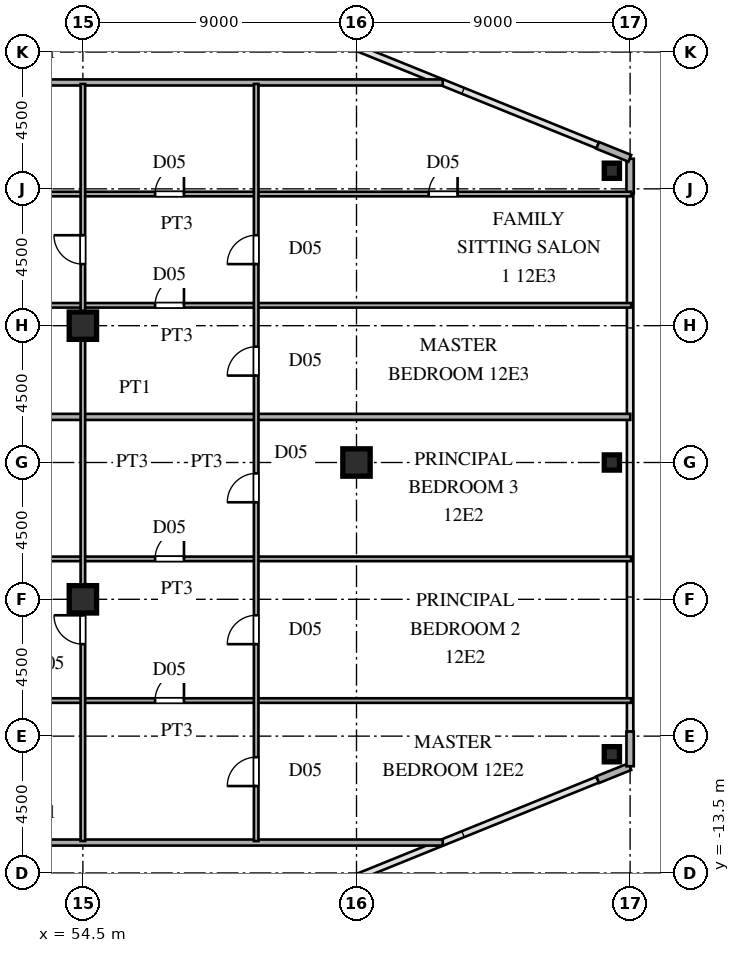
"""IFC4 building model, lengths in metres.
Left out: names, types, materials, properties, quantities, classifications, styles, units other than length and angle.
Written with IfcOpenShell. Run it as: python <this file> out.ifc"""

import sys

from ifc_helpers import new_model, si_unit, direction, frame, frame_2d, origin, origin_2d, place, context, subcontext, project, spatial, rectangle, hollow_rectangle, i_section, extrude, source, transform, mapped, element, fill, save


model = new_model("IFC4")
c1 = context("Model", 3, precision=1e-05, world=origin(), true_north=direction((0.0, 1.0)))
c2 = subcontext(c1, "Body", "Model", "MODEL_VIEW")
j1 = project(units=[si_unit("LENGTHUNIT", "METRE"), si_unit("PLANEANGLEUNIT", "RADIAN")], contexts=[c1])
p1 = place(None, origin())
s1 = spatial("IfcSite", under=j1, at=p1, CompositionType="ELEMENT")
p2 = place(p1, origin())
s2 = spatial("IfcBuilding", under=s1, at=p2, CompositionType="ELEMENT")
p3 = place(p2, frame((0.0, 0.0, 47.7)))
s3 = spatial("IfcBuildingStorey", under=s2, at=p3, CompositionType="ELEMENT", Elevation=47.7)
m1 = source(origin(), c2, "Body", "SweptSolid", [
    extrude(i_section(OverallWidth=0.9, OverallDepth=0.9, WebThickness=0.036, FlangeThickness=0.055, at=origin_2d()), origin(), (0.0, 0.0, 1.0), 3.6),
])
for number, where, z_axis, x_axis in (
    (1, (54.5, -4.5, 0.0), (0.0, 0.0, 1.0), (1.0, 0.0, 0.0)),
    (2, (54.5, 4.5, 0.0), (0.0, 0.0, 1.0), (1.0, 0.0, 0.0)),
    (3, (63.5, 0.0, 0.0), (0.0, 0.0, 1.0), (1.0, 0.0, 0.0)),
):
    element("IfcColumn", number, at=place(p3, frame(where, z_axis=z_axis, x_axis=x_axis)), inside=s3, PredefinedType="COLUMN", context=c2, shape_type="MappedRepresentation", body=[
        mapped(m1, transform((0.0, 0.0, 0.0), scale=1.0)),
    ])
m2 = source(origin(), c2, "Body", "SweptSolid", [
    extrude(hollow_rectangle(XDim=0.5, YDim=0.5, WallThickness=0.02, at=origin_2d()), origin(), (0.0, 0.0, 1.0), 3.6),
])
for number, where, z_axis, x_axis in (
    (4, (71.9, -9.596, 0.0), (0.0, 0.0, 1.0), (1.0, 0.0, 0.0)),
    (5, (71.9, 9.596, 0.0), (0.0, 0.0, 1.0), (1.0, 0.0, 0.0)),
    (6, (71.9, 0.0, 0.0), (0.0, 0.0, 1.0), (1.0, 0.0, 0.0)),
):
    element("IfcColumn", number, at=place(p3, frame(where, z_axis=z_axis, x_axis=x_axis)), inside=s3, PredefinedType="COLUMN", context=c2, shape_type="MappedRepresentation", body=[
        mapped(m2, transform((0.0, 0.0, 0.0), scale=1.0)),
    ])
for number, where, z_axis, x_axis in (
    (7, (71.434, -10.431, 0.0), (0.0, 0.0, 1.0), (0.927, 0.375, 0.0)),
    (8, (72.5, -9.99, 0.0), (0.0, 0.0, 1.0), (0.0, 1.0, 0.0)),
    (9, (72.5, 8.85, 0.0), (0.0, 0.0, 1.0), (0.0, 1.0, 0.0)),
    (10, (72.491, 10.004, 0.0), (0.0, 0.0, 1.0), (-0.927, 0.375, 0.0)),
):
    element("IfcWall", number, at=place(p3, frame(where, z_axis=z_axis, x_axis=x_axis)), inside=s3, PredefinedType="SOLIDWALL", context=c2, shape_type="SweptSolid", body=[
        extrude(rectangle(XDim=1.14, YDim=0.24, at=frame_2d((0.57, 0.0))), origin(), (0.0, 0.0, 1.0), 3.38),
    ])
p4 = place(p3, frame((39.93, -12.5, 0.0), z_axis=(0.0, 0.0, 1.0), x_axis=(1.0, 0.0, 0.0)))
e11 = element("IfcWall", 11, at=p4, inside=s3, PredefinedType="PARTITIONING", context=c2, shape_type="SweptSolid", body=[
    extrude(rectangle(XDim=26.407, YDim=0.2, at=frame_2d((13.204, 0.0))), origin(), (0.0, 0.0, 1.0), 3.38),
])
p5 = place(p3, frame((42.65, -7.83, 0.0), z_axis=(0.0, 0.0, 1.0), x_axis=(1.0, 0.0, 0.0)))
e12 = element("IfcWall", 12, at=p5, inside=s3, PredefinedType="PARTITIONING", context=c2, shape_type="SweptSolid", body=[
    extrude(rectangle(XDim=29.885, YDim=0.15, at=frame_2d((14.942, 0.0))), origin(), (0.0, 0.0, 1.0), 3.38),
])
p6 = place(p5, frame((5.425, 0.0, 0.0)))
e13 = element("IfcOpeningElement", 13, at=p6, cuts=e12, PredefinedType="OPENING", context=c2, shape_type="SweptSolid", body=[
    extrude(rectangle(XDim=0.95, YDim=2.15, at=frame_2d((0.475, 1.075))), frame((0.0, 0.085, 0.0), z_axis=(0.0, -1.0, 0.0), x_axis=(1.0, 0.0, 0.0)), (0.0, 0.0, 1.0), 0.17),
])
p7 = place(p5, frame((14.225, 0.0, 0.0)))
e14 = element("IfcOpeningElement", 14, at=p7, cuts=e12, PredefinedType="OPENING", context=c2, shape_type="SweptSolid", body=[
    extrude(rectangle(XDim=0.95, YDim=2.15, at=frame_2d((0.475, 1.075))), frame((0.0, 0.085, 0.0), z_axis=(0.0, -1.0, 0.0), x_axis=(1.0, 0.0, 0.0)), (0.0, 0.0, 1.0), 0.17),
])
p8 = place(p3, frame((42.65, -3.17, 0.0), z_axis=(0.0, 0.0, 1.0), x_axis=(1.0, 0.0, 0.0)))
e15 = element("IfcWall", 15, at=p8, inside=s3, PredefinedType="PARTITIONING", context=c2, shape_type="SweptSolid", body=[
    extrude(rectangle(XDim=29.885, YDim=0.15, at=frame_2d((14.942, 0.0))), origin(), (0.0, 0.0, 1.0), 3.38),
])
p9 = place(p8, frame((5.425, 0.0, 0.0)))
e16 = element("IfcOpeningElement", 16, at=p9, cuts=e15, PredefinedType="OPENING", context=c2, shape_type="SweptSolid", body=[
    extrude(rectangle(XDim=0.95, YDim=2.15, at=frame_2d((0.475, 1.075))), frame((0.0, 0.085, 0.0), z_axis=(0.0, -1.0, 0.0), x_axis=(1.0, 0.0, 0.0)), (0.0, 0.0, 1.0), 0.17),
])
p10 = place(p8, frame((14.225, 0.0, 0.0)))
e17 = element("IfcOpeningElement", 17, at=p10, cuts=e15, PredefinedType="OPENING", context=c2, shape_type="SweptSolid", body=[
    extrude(rectangle(XDim=0.95, YDim=2.15, at=frame_2d((0.475, 1.075))), frame((0.0, 0.085, 0.0), z_axis=(0.0, -1.0, 0.0), x_axis=(1.0, 0.0, 0.0)), (0.0, 0.0, 1.0), 0.17),
])
p11 = place(p3, frame((39.93, 1.5, 0.0), z_axis=(0.0, 0.0, 1.0), x_axis=(1.0, 0.0, 0.0)))
e18 = element("IfcWall", 18, at=p11, inside=s3, PredefinedType="PARTITIONING", context=c2, shape_type="SweptSolid", body=[
    extrude(rectangle(XDim=32.575, YDim=0.2, at=frame_2d((16.288, 0.0))), origin(), (0.0, 0.0, 1.0), 3.38),
])
p12 = place(p3, frame((42.65, 5.17, 0.0), z_axis=(0.0, 0.0, 1.0), x_axis=(1.0, 0.0, 0.0)))
e19 = element("IfcWall", 19, at=p12, inside=s3, PredefinedType="PARTITIONING", context=c2, shape_type="SweptSolid", body=[
    extrude(rectangle(XDim=29.885, YDim=0.15, at=frame_2d((14.942, 0.0))), origin(), (0.0, 0.0, 1.0), 3.38),
])
p13 = place(p12, frame((5.425, 0.0, 0.0)))
e20 = element("IfcOpeningElement", 20, at=p13, cuts=e19, PredefinedType="OPENING", context=c2, shape_type="SweptSolid", body=[
    extrude(rectangle(XDim=0.95, YDim=2.15, at=frame_2d((0.475, 1.075))), frame((0.0, 0.085, 0.0), z_axis=(0.0, -1.0, 0.0), x_axis=(1.0, 0.0, 0.0)), (0.0, 0.0, 1.0), 0.17),
])
p14 = place(p12, frame((14.225, 0.0, 0.0)))
e21 = element("IfcOpeningElement", 21, at=p14, cuts=e19, PredefinedType="OPENING", context=c2, shape_type="SweptSolid", body=[
    extrude(rectangle(XDim=0.95, YDim=2.15, at=frame_2d((0.475, 1.075))), frame((0.0, 0.085, 0.0), z_axis=(0.0, -1.0, 0.0), x_axis=(1.0, 0.0, 0.0)), (0.0, 0.0, 1.0), 0.17),
])
p15 = place(p3, frame((42.65, 8.83, 0.0), z_axis=(0.0, 0.0, 1.0), x_axis=(1.0, 0.0, 0.0)))
e22 = element("IfcWall", 22, at=p15, inside=s3, PredefinedType="PARTITIONING", context=c2, shape_type="SweptSolid", body=[
    extrude(rectangle(XDim=29.885, YDim=0.15, at=frame_2d((14.942, 0.0))), origin(), (0.0, 0.0, 1.0), 3.38),
])
p16 = place(p15, frame((5.425, 0.0, 0.0)))
e23 = element("IfcOpeningElement", 23, at=p16, cuts=e22, PredefinedType="OPENING", context=c2, shape_type="SweptSolid", body=[
    extrude(rectangle(XDim=0.95, YDim=2.15, at=frame_2d((0.475, 1.075))), frame((0.0, 0.085, 0.0), z_axis=(0.0, -1.0, 0.0), x_axis=(1.0, 0.0, 0.0)), (0.0, 0.0, 1.0), 0.17),
])
p17 = place(p15, frame((23.225, 0.0, 0.0)))
e24 = element("IfcOpeningElement", 24, at=p17, cuts=e22, PredefinedType="OPENING", context=c2, shape_type="SweptSolid", body=[
    extrude(rectangle(XDim=0.95, YDim=2.15, at=frame_2d((0.475, 1.075))), frame((0.0, 0.085, 0.0), z_axis=(0.0, -1.0, 0.0), x_axis=(1.0, 0.0, 0.0)), (0.0, 0.0, 1.0), 0.17),
])
p18 = place(p15, frame((14.225, 0.0, 0.0)))
e25 = element("IfcOpeningElement", 25, at=p18, cuts=e22, PredefinedType="OPENING", context=c2, shape_type="SweptSolid", body=[
    extrude(rectangle(XDim=0.95, YDim=2.15, at=frame_2d((0.475, 1.075))), frame((0.0, 0.085, 0.0), z_axis=(0.0, -1.0, 0.0), x_axis=(1.0, 0.0, 0.0)), (0.0, 0.0, 1.0), 0.17),
])
p19 = place(p3, frame((39.93, 12.5, 0.0), z_axis=(0.0, 0.0, 1.0), x_axis=(1.0, 0.0, 0.0)))
e26 = element("IfcWall", 26, at=p19, inside=s3, PredefinedType="PARTITIONING", context=c2, shape_type="SweptSolid", body=[
    extrude(rectangle(XDim=26.407, YDim=0.2, at=frame_2d((13.204, 0.0))), origin(), (0.0, 0.0, 1.0), 3.38),
])
p20 = place(p3, frame((54.5, -12.45, 0.0), z_axis=(0.0, 0.0, 1.0), x_axis=(0.0, 1.0, 0.0)))
e27 = element("IfcWall", 27, at=p20, inside=s3, PredefinedType="PARTITIONING", context=c2, shape_type="SweptSolid", body=[
    extrude(rectangle(XDim=24.9, YDim=0.15, at=frame_2d((12.45, 0.0))), origin(), (0.0, 0.0, 1.0), 2.68),
])
p21 = place(p20, frame((6.475, 0.0, 0.0)))
e28 = element("IfcOpeningElement", 28, at=p21, cuts=e27, PredefinedType="OPENING", context=c2, shape_type="SweptSolid", body=[
    extrude(rectangle(XDim=0.95, YDim=2.15, at=frame_2d((0.475, 1.075))), frame((0.0, 0.085, 0.0), z_axis=(0.0, -1.0, 0.0), x_axis=(1.0, 0.0, 0.0)), (0.0, 0.0, 1.0), 0.17),
])
p22 = place(p20, frame((18.975, 0.0, 0.0)))
e29 = element("IfcOpeningElement", 29, at=p22, cuts=e27, PredefinedType="OPENING", context=c2, shape_type="SweptSolid", body=[
    extrude(rectangle(XDim=0.95, YDim=2.15, at=frame_2d((0.475, 1.075))), frame((0.0, 0.085, 0.0), z_axis=(0.0, -1.0, 0.0), x_axis=(1.0, 0.0, 0.0)), (0.0, 0.0, 1.0), 0.17),
])
p23 = place(p3, frame((60.2, -12.45, 0.0), z_axis=(0.0, 0.0, 1.0), x_axis=(0.0, 1.0, 0.0)))
e30 = element("IfcWall", 30, at=p23, inside=s3, PredefinedType="PARTITIONING", context=c2, shape_type="SweptSolid", body=[
    extrude(rectangle(XDim=24.9, YDim=0.15, at=frame_2d((12.45, 0.0))), origin(), (0.0, 0.0, 1.0), 3.38),
])
p24 = place(p23, frame((1.808, 0.0, 0.0)))
e31 = element("IfcOpeningElement", 31, at=p24, cuts=e30, PredefinedType="OPENING", context=c2, shape_type="SweptSolid", body=[
    extrude(rectangle(XDim=0.95, YDim=2.15, at=frame_2d((0.475, 1.075))), frame((0.0, 0.085, 0.0), z_axis=(0.0, -1.0, 0.0), x_axis=(1.0, 0.0, 0.0)), (0.0, 0.0, 1.0), 0.17),
])
p25 = place(p23, frame((6.475, 0.0, 0.0)))
e32 = element("IfcOpeningElement", 32, at=p25, cuts=e30, PredefinedType="OPENING", context=c2, shape_type="SweptSolid", body=[
    extrude(rectangle(XDim=0.95, YDim=2.15, at=frame_2d((0.475, 1.075))), frame((0.0, 0.085, 0.0), z_axis=(0.0, -1.0, 0.0), x_axis=(1.0, 0.0, 0.0)), (0.0, 0.0, 1.0), 0.17),
])
p26 = place(p23, frame((11.142, 0.0, 0.0)))
e33 = element("IfcOpeningElement", 33, at=p26, cuts=e30, PredefinedType="OPENING", context=c2, shape_type="SweptSolid", body=[
    extrude(rectangle(XDim=0.95, YDim=2.15, at=frame_2d((0.475, 1.075))), frame((0.0, 0.085, 0.0), z_axis=(0.0, -1.0, 0.0), x_axis=(1.0, 0.0, 0.0)), (0.0, 0.0, 1.0), 0.17),
])
p27 = place(p23, frame((15.308, 0.0, 0.0)))
e34 = element("IfcOpeningElement", 34, at=p27, cuts=e30, PredefinedType="OPENING", context=c2, shape_type="SweptSolid", body=[
    extrude(rectangle(XDim=0.95, YDim=2.15, at=frame_2d((0.475, 1.075))), frame((0.0, 0.085, 0.0), z_axis=(0.0, -1.0, 0.0), x_axis=(1.0, 0.0, 0.0)), (0.0, 0.0, 1.0), 0.17),
])
p28 = place(p23, frame((18.975, 0.0, 0.0)))
e35 = element("IfcOpeningElement", 35, at=p28, cuts=e30, PredefinedType="OPENING", context=c2, shape_type="SweptSolid", body=[
    extrude(rectangle(XDim=0.95, YDim=2.15, at=frame_2d((0.475, 1.075))), frame((0.0, 0.085, 0.0), z_axis=(0.0, -1.0, 0.0), x_axis=(1.0, 0.0, 0.0)), (0.0, 0.0, 1.0), 0.17),
])
m3 = source(origin(), c2, "Body", "SweptSolid", [
    extrude(rectangle(XDim=0.95, YDim=2.15, at=frame_2d((0.475, 1.075))), frame((0.0, 0.025, 0.0), z_axis=(0.0, -1.0, 0.0), x_axis=(1.0, 0.0, 0.0)), (0.0, 0.0, 1.0), 0.05),
])
p29 = place(p7, origin())
e36 = element("IfcDoor", 36, at=p29, inside=s3, OperationType="SINGLE_SWING_RIGHT", PredefinedType="DOOR", context=c2, shape_type="MappedRepresentation", body=[
    mapped(m3, transform((0.0, 0.0, 0.0), scale=1.0)),
])
fill(e14, e36)
p30 = place(p10, origin())
e37 = element("IfcDoor", 37, at=p30, inside=s3, OperationType="SINGLE_SWING_RIGHT", PredefinedType="DOOR", context=c2, shape_type="MappedRepresentation", body=[
    mapped(m3, transform((0.0, 0.0, 0.0), scale=1.0)),
])
fill(e17, e37)
p31 = place(p14, origin())
e38 = element("IfcDoor", 38, at=p31, inside=s3, OperationType="SINGLE_SWING_RIGHT", PredefinedType="DOOR", context=c2, shape_type="MappedRepresentation", body=[
    mapped(m3, transform((0.0, 0.0, 0.0), scale=1.0)),
])
fill(e21, e38)
p32 = place(p17, origin())
e39 = element("IfcDoor", 39, at=p32, inside=s3, OperationType="SINGLE_SWING_RIGHT", PredefinedType="DOOR", context=c2, shape_type="MappedRepresentation", body=[
    mapped(m3, transform((0.0, 0.0, 0.0), scale=1.0)),
])
fill(e24, e39)
p33 = place(p18, origin())
e40 = element("IfcDoor", 40, at=p33, inside=s3, OperationType="SINGLE_SWING_RIGHT", PredefinedType="DOOR", context=c2, shape_type="MappedRepresentation", body=[
    mapped(m3, transform((0.0, 0.0, 0.0), scale=1.0)),
])
fill(e25, e40)
p34 = place(p21, origin())
e41 = element("IfcDoor", 41, at=p34, inside=s3, OperationType="SINGLE_SWING_RIGHT", PredefinedType="DOOR", context=c2, shape_type="MappedRepresentation", body=[
    mapped(m3, transform((0.0, 0.0, 0.0), scale=1.0)),
])
fill(e28, e41)
p35 = place(p22, origin())
e42 = element("IfcDoor", 42, at=p35, inside=s3, OperationType="SINGLE_SWING_RIGHT", PredefinedType="DOOR", context=c2, shape_type="MappedRepresentation", body=[
    mapped(m3, transform((0.0, 0.0, 0.0), scale=1.0)),
])
fill(e29, e42)
p36 = place(p24, origin())
e43 = element("IfcDoor", 43, at=p36, inside=s3, OperationType="SINGLE_SWING_LEFT", PredefinedType="DOOR", context=c2, shape_type="MappedRepresentation", body=[
    mapped(m3, transform((0.0, 0.0, 0.0), scale=1.0)),
])
fill(e31, e43)
p37 = place(p25, origin())
e44 = element("IfcDoor", 44, at=p37, inside=s3, OperationType="SINGLE_SWING_LEFT", PredefinedType="DOOR", context=c2, shape_type="MappedRepresentation", body=[
    mapped(m3, transform((0.0, 0.0, 0.0), scale=1.0)),
])
fill(e32, e44)
p38 = place(p26, origin())
e45 = element("IfcDoor", 45, at=p38, inside=s3, OperationType="SINGLE_SWING_LEFT", PredefinedType="DOOR", context=c2, shape_type="MappedRepresentation", body=[
    mapped(m3, transform((0.0, 0.0, 0.0), scale=1.0)),
])
fill(e33, e45)
p39 = place(p27, origin())
e46 = element("IfcDoor", 46, at=p39, inside=s3, OperationType="SINGLE_SWING_LEFT", PredefinedType="DOOR", context=c2, shape_type="MappedRepresentation", body=[
    mapped(m3, transform((0.0, 0.0, 0.0), scale=1.0)),
])
fill(e34, e46)
p40 = place(p28, origin())
e47 = element("IfcDoor", 47, at=p40, inside=s3, OperationType="SINGLE_SWING_LEFT", PredefinedType="DOOR", context=c2, shape_type="MappedRepresentation", body=[
    mapped(m3, transform((0.0, 0.0, 0.0), scale=1.0)),
])
fill(e35, e47)
save(model, sys.argv[1])
